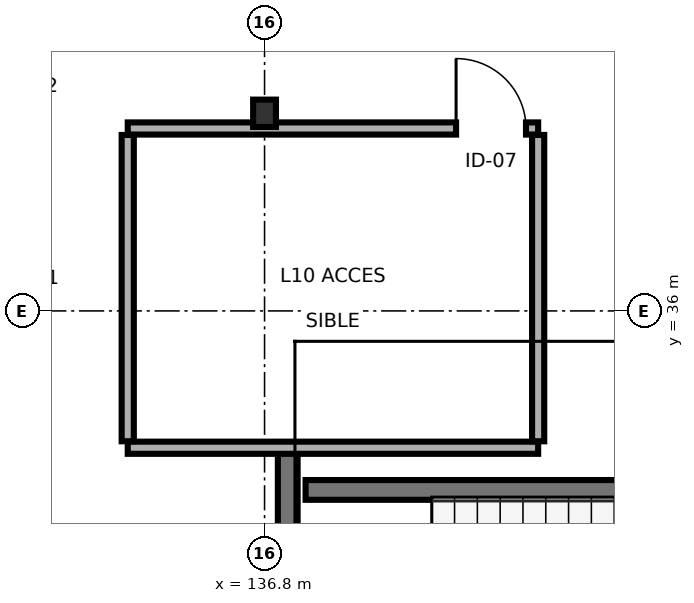
"""IFC4 building model, lengths in metres.
Left out: names, types, materials, properties, quantities, classifications, styles, units other than length and angle.
Written with IfcOpenShell. Run it as: python <this file> out.ifc"""

import sys

from ifc_helpers import new_model, si_unit, direction, frame, frame_2d, origin, origin_2d, place, context, subcontext, project, spatial, rectangle, i_section, extrude, element, fill, save


model = new_model("IFC4")
c1 = context("Model", 3, precision=1e-05, world=origin(), true_north=direction((0.0, 1.0)))
c2 = subcontext(c1, "Body", "Model", "MODEL_VIEW")
j1 = project(units=[si_unit("LENGTHUNIT", "METRE"), si_unit("PLANEANGLEUNIT", "RADIAN")], contexts=[c1])
p1 = place(None, origin())
s1 = spatial("IfcSite", under=j1, at=p1, CompositionType="ELEMENT")
p2 = place(p1, origin())
s2 = spatial("IfcBuilding", under=s1, at=p2, CompositionType="ELEMENT")
p3 = place(p2, frame((0.0, 0.0, 35.1)))
s3 = spatial("IfcBuildingStorey", under=s2, at=p3, CompositionType="ELEMENT", Elevation=35.1)
p4 = place(p3, frame((136.8, 38.6, 0.0), z_axis=(0.0, 0.0, 1.0), x_axis=(1.0, 0.0, 0.0)))
e1 = element("IfcColumn", 1, at=p4, inside=s3, PredefinedType="COLUMN", context=c2, shape_type="SweptSolid", body=[
    extrude(i_section(OverallWidth=0.3, OverallDepth=0.36, WebThickness=0.012, FlangeThickness=0.022, FilletRadius=0.027, at=origin_2d()), origin(), (0.0, 0.0, 1.0), 3.4),
])
p5 = place(p3, frame((137.105, 29.54, 0.0), z_axis=(0.0, 0.0, 1.0), x_axis=(0.0, 1.0, 0.0)))
e2 = element("IfcWall", 2, at=p5, inside=s3, PredefinedType="SHEAR", context=c2, shape_type="SweptSolid", body=[
    extrude(rectangle(XDim=4.635, YDim=0.26, at=frame_2d((2.317, 0.0))), origin(), (0.0, 0.0, 1.0), 3.165),
])
p6 = place(p5, frame((0.61, 0.0, 0.0)))
e3 = element("IfcOpeningElement", 3, at=p6, cuts=e2, PredefinedType="OPENING", context=c2, shape_type="SweptSolid", body=[
    extrude(rectangle(XDim=1.1, YDim=2.2, at=frame_2d((0.55, 1.1))), frame((0.0, 0.14, 0.0), z_axis=(0.0, -1.0, 0.0), x_axis=(1.0, 0.0, 0.0)), (0.0, 0.0, 1.0), 0.28),
])
p7 = place(p3, frame((137.34, 33.645, 0.0), z_axis=(0.0, 0.0, 1.0), x_axis=(1.0, 0.0, 0.0)))
e4 = element("IfcWall", 4, at=p7, inside=s3, PredefinedType="SHEAR", context=c2, shape_type="SweptSolid", body=[
    extrude(rectangle(XDim=8.52, YDim=0.26, at=frame_2d((4.26, 0.0))), origin(), (0.0, 0.0, 1.0), 3.165),
])
p8 = place(p3, frame((135.0, 34.2, 0.0), z_axis=(0.0, 0.0, 1.0), x_axis=(1.0, 0.0, 0.0)))
e5 = element("IfcWall", 5, at=p8, inside=s3, PredefinedType="PARTITIONING", context=c2, shape_type="SweptSolid", body=[
    extrude(rectangle(XDim=5.4, YDim=0.16, at=frame_2d((2.7, 0.0))), origin(), (0.0, 0.0, 1.0), 2.7),
])
p9 = place(p3, frame((135.0, 38.4, 0.0), z_axis=(0.0, 0.0, 1.0), x_axis=(1.0, 0.0, 0.0)))
e6 = element("IfcWall", 6, at=p9, inside=s3, PredefinedType="PARTITIONING", context=c2, shape_type="SweptSolid", body=[
    extrude(rectangle(XDim=5.4, YDim=0.16, at=frame_2d((2.7, 0.0))), origin(), (0.0, 0.0, 1.0), 2.7),
])
p10 = place(p9, frame((4.32, 0.0, 0.0)))
e7 = element("IfcOpeningElement", 7, at=p10, cuts=e6, PredefinedType="OPENING", context=c2, shape_type="SweptSolid", body=[
    extrude(rectangle(XDim=0.92, YDim=2.1, at=frame_2d((0.46, 1.05))), frame((0.0, 0.09, 0.0), z_axis=(0.0, -1.0, 0.0), x_axis=(1.0, 0.0, 0.0)), (0.0, 0.0, 1.0), 0.18),
])
p11 = place(p3, frame((135.0, 34.285, 0.0), z_axis=(0.0, 0.0, 1.0), x_axis=(0.0, 1.0, 0.0)))
e8 = element("IfcWall", 8, at=p11, inside=s3, PredefinedType="PARTITIONING", context=c2, shape_type="SweptSolid", body=[
    extrude(rectangle(XDim=4.03, YDim=0.16, at=frame_2d((2.015, 0.0))), origin(), (0.0, 0.0, 1.0), 2.75),
])
p12 = place(p3, frame((140.4, 34.285, 0.0), z_axis=(0.0, 0.0, 1.0), x_axis=(0.0, 1.0, 0.0)))
e9 = element("IfcWall", 9, at=p12, inside=s3, PredefinedType="PARTITIONING", context=c2, shape_type="SweptSolid", body=[
    extrude(rectangle(XDim=4.03, YDim=0.16, at=frame_2d((2.015, 0.0))), origin(), (0.0, 0.0, 1.0), 3.165),
])
p13 = place(p10, origin())
e10 = element("IfcDoor", 10, at=p13, inside=s3, OperationType="SINGLE_SWING_LEFT", PredefinedType="DOOR", context=c2, shape_type="SweptSolid", body=[
    extrude(rectangle(XDim=0.92, YDim=2.1, at=frame_2d((0.46, 1.05))), frame((0.0, 0.025, 0.0), z_axis=(0.0, -1.0, 0.0), x_axis=(1.0, 0.0, 0.0)), (0.0, 0.0, 1.0), 0.05),
])
fill(e7, e10)
save(model, sys.argv[1])
